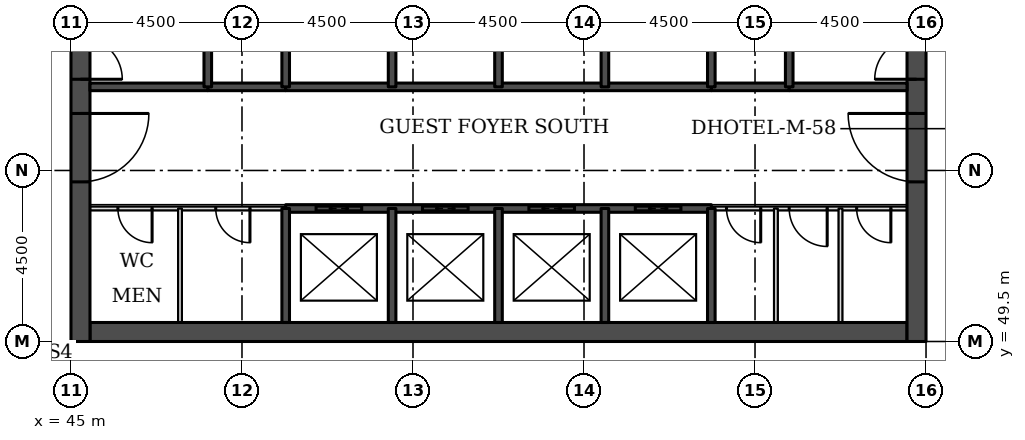
"""IFC4 building model, lengths in metres.
Left out: names, types, materials, properties, quantities, classifications, styles, units other than length and angle.
Written with IfcOpenShell. Run it as: python <this file> out.ifc"""

import sys

from ifc_helpers import new_model, si_unit, direction, frame, frame_2d, origin, place, context, subcontext, project, spatial, rectangle, extrude, element, fill, save


model = new_model("IFC4")
c1 = context("Model", 3, precision=1e-05, world=origin(), true_north=direction((0.0, 1.0)))
c2 = subcontext(c1, "Body", "Model", "MODEL_VIEW")
j1 = project(units=[si_unit("LENGTHUNIT", "METRE"), si_unit("PLANEANGLEUNIT", "RADIAN")], contexts=[c1])
p1 = place(None, origin())
s1 = spatial("IfcSite", under=j1, at=p1, CompositionType="ELEMENT")
p2 = place(p1, origin())
s2 = spatial("IfcBuilding", under=s1, at=p2, CompositionType="ELEMENT")
p3 = place(p2, frame((0.0, 0.0, 23.1)))
s3 = spatial("IfcBuildingStorey", under=s2, at=p3, CompositionType="ELEMENT", Elevation=23.1)
p4 = place(p3, frame((45.5, 49.75, 0.0), z_axis=(0.0, 0.0, 1.0), x_axis=(1.0, 0.0, 0.0)))
e1 = element("IfcWall", 1, at=p4, inside=s3, PredefinedType="SHEAR", context=c2, shape_type="SweptSolid", body=[
    extrude(rectangle(XDim=21.5, YDim=0.5, at=frame_2d((10.75, 0.0))), origin(), (0.0, 0.0, 1.0), 3.3),
])
p5 = place(p3, frame((45.25, 49.5, 0.0), z_axis=(0.0, 0.0, 1.0), x_axis=(0.0, 1.0, 0.0)))
e2 = element("IfcWall", 2, at=p5, inside=s3, PredefinedType="SHEAR", context=c2, shape_type="SweptSolid", body=[
    extrude(rectangle(XDim=22.5, YDim=0.5, at=frame_2d((11.25, 0.0))), origin(), (0.0, 0.0, 1.0), 3.3),
])
p6 = place(p5, frame((4.2, 0.0, 0.0)))
e3 = element("IfcOpeningElement", 3, at=p6, cuts=e2, PredefinedType="OPENING", context=c2, shape_type="SweptSolid", body=[
    extrude(rectangle(XDim=1.8, YDim=2.1, at=frame_2d((0.9, 1.05))), frame((0.0, 0.26, 0.0), z_axis=(0.0, -1.0, 0.0), x_axis=(1.0, 0.0, 0.0)), (0.0, 0.0, 1.0), 0.52),
])
p7 = place(p5, frame((6.9, 0.0, 0.0)))
e4 = element("IfcOpeningElement", 4, at=p7, cuts=e2, PredefinedType="OPENING", context=c2, shape_type="SweptSolid", body=[
    extrude(rectangle(XDim=1.1, YDim=2.1, at=frame_2d((0.55, 1.05))), frame((0.0, 0.26, 0.0), z_axis=(0.0, -1.0, 0.0), x_axis=(1.0, 0.0, 0.0)), (0.0, 0.0, 1.0), 0.52),
])
p8 = place(p5, frame((13.6, 0.0, 0.0)))
e5 = element("IfcOpeningElement", 5, at=p8, cuts=e2, PredefinedType="OPENING", context=c2, shape_type="SweptSolid", body=[
    extrude(rectangle(XDim=1.1, YDim=2.1, at=frame_2d((0.55, 1.05))), frame((0.0, 0.26, 0.0), z_axis=(0.0, -1.0, 0.0), x_axis=(1.0, 0.0, 0.0)), (0.0, 0.0, 1.0), 0.52),
])
p9 = place(p5, frame((16.5, 0.0, 0.0)))
e6 = element("IfcOpeningElement", 6, at=p9, cuts=e2, PredefinedType="OPENING", context=c2, shape_type="SweptSolid", body=[
    extrude(rectangle(XDim=1.8, YDim=2.1, at=frame_2d((0.9, 1.05))), frame((0.0, 0.26, 0.0), z_axis=(0.0, -1.0, 0.0), x_axis=(1.0, 0.0, 0.0)), (0.0, 0.0, 1.0), 0.52),
])
p10 = place(p3, frame((67.25, 49.5, 0.0), z_axis=(0.0, 0.0, 1.0), x_axis=(0.0, 1.0, 0.0)))
e7 = element("IfcWall", 7, at=p10, inside=s3, PredefinedType="SHEAR", context=c2, shape_type="SweptSolid", body=[
    extrude(rectangle(XDim=22.5, YDim=0.5, at=frame_2d((11.25, 0.0))), origin(), (0.0, 0.0, 1.0), 3.3),
])
p11 = place(p10, frame((4.2, 0.0, 0.0)))
e8 = element("IfcOpeningElement", 8, at=p11, cuts=e7, PredefinedType="OPENING", context=c2, shape_type="SweptSolid", body=[
    extrude(rectangle(XDim=1.8, YDim=2.1, at=frame_2d((0.9, 1.05))), frame((0.0, 0.26, 0.0), z_axis=(0.0, -1.0, 0.0), x_axis=(1.0, 0.0, 0.0)), (0.0, 0.0, 1.0), 0.52),
])
p12 = place(p10, frame((6.9, 0.0, 0.0)))
e9 = element("IfcOpeningElement", 9, at=p12, cuts=e7, PredefinedType="OPENING", context=c2, shape_type="SweptSolid", body=[
    extrude(rectangle(XDim=1.1, YDim=2.1, at=frame_2d((0.55, 1.05))), frame((0.0, 0.26, 0.0), z_axis=(0.0, -1.0, 0.0), x_axis=(1.0, 0.0, 0.0)), (0.0, 0.0, 1.0), 0.52),
])
p13 = place(p10, frame((13.6, 0.0, 0.0)))
e10 = element("IfcOpeningElement", 10, at=p13, cuts=e7, PredefinedType="OPENING", context=c2, shape_type="SweptSolid", body=[
    extrude(rectangle(XDim=1.1, YDim=2.1, at=frame_2d((0.55, 1.05))), frame((0.0, 0.26, 0.0), z_axis=(0.0, -1.0, 0.0), x_axis=(1.0, 0.0, 0.0)), (0.0, 0.0, 1.0), 0.52),
])
p14 = place(p10, frame((16.5, 0.0, 0.0)))
e11 = element("IfcOpeningElement", 11, at=p14, cuts=e7, PredefinedType="OPENING", context=c2, shape_type="SweptSolid", body=[
    extrude(rectangle(XDim=1.8, YDim=2.1, at=frame_2d((0.9, 1.05))), frame((0.0, 0.26, 0.0), z_axis=(0.0, -1.0, 0.0), x_axis=(1.0, 0.0, 0.0)), (0.0, 0.0, 1.0), 0.52),
])
p15 = place(p3, frame((45.5, 53.0, 0.0), z_axis=(0.0, 0.0, 1.0), x_axis=(1.0, 0.0, 0.0)))
e12 = element("IfcWall", 12, at=p15, inside=s3, PredefinedType="PARTITIONING", context=c2, shape_type="SweptSolid", body=[
    extrude(rectangle(XDim=5.15, YDim=0.1, at=frame_2d((2.575, 0.0))), origin(), (0.0, 0.0, 1.0), 3.08),
])
p16 = place(p15, frame((0.735, 0.0, 0.0)))
e13 = element("IfcOpeningElement", 13, at=p16, cuts=e12, PredefinedType="OPENING", context=c2, shape_type="SweptSolid", body=[
    extrude(rectangle(XDim=0.9, YDim=2.1, at=frame_2d((0.45, 1.05))), frame((0.0, 0.06, 0.0), z_axis=(0.0, -1.0, 0.0), x_axis=(1.0, 0.0, 0.0)), (0.0, 0.0, 1.0), 0.12),
])
p17 = place(p15, frame((3.31, 0.0, 0.0)))
e14 = element("IfcOpeningElement", 14, at=p17, cuts=e12, PredefinedType="OPENING", context=c2, shape_type="SweptSolid", body=[
    extrude(rectangle(XDim=0.9, YDim=2.1, at=frame_2d((0.45, 1.05))), frame((0.0, 0.06, 0.0), z_axis=(0.0, -1.0, 0.0), x_axis=(1.0, 0.0, 0.0)), (0.0, 0.0, 1.0), 0.12),
])
p18 = place(p3, frame((61.85, 53.0, 0.0), z_axis=(0.0, 0.0, 1.0), x_axis=(1.0, 0.0, 0.0)))
e15 = element("IfcWall", 15, at=p18, inside=s3, PredefinedType="PARTITIONING", context=c2, shape_type="SweptSolid", body=[
    extrude(rectangle(XDim=5.15, YDim=0.1, at=frame_2d((2.575, 0.0))), origin(), (0.0, 0.0, 1.0), 3.08),
])
p19 = place(p18, frame((3.824, 0.0, 0.0)))
e16 = element("IfcOpeningElement", 16, at=p19, cuts=e15, PredefinedType="OPENING", context=c2, shape_type="SweptSolid", body=[
    extrude(rectangle(XDim=0.9, YDim=2.1, at=frame_2d((0.45, 1.05))), frame((0.0, 0.06, 0.0), z_axis=(0.0, -1.0, 0.0), x_axis=(1.0, 0.0, 0.0)), (0.0, 0.0, 1.0), 0.12),
])
p20 = place(p18, frame((2.049, 0.0, 0.0)))
e17 = element("IfcOpeningElement", 17, at=p20, cuts=e15, PredefinedType="OPENING", context=c2, shape_type="SweptSolid", body=[
    extrude(rectangle(XDim=1.0, YDim=2.1, at=frame_2d((0.5, 1.05))), frame((0.0, 0.06, 0.0), z_axis=(0.0, -1.0, 0.0), x_axis=(1.0, 0.0, 0.0)), (0.0, 0.0, 1.0), 0.12),
])
p21 = place(p18, frame((0.4, 0.0, 0.0)))
e18 = element("IfcOpeningElement", 18, at=p21, cuts=e15, PredefinedType="OPENING", context=c2, shape_type="SweptSolid", body=[
    extrude(rectangle(XDim=0.9, YDim=2.1, at=frame_2d((0.45, 1.05))), frame((0.0, 0.06, 0.0), z_axis=(0.0, -1.0, 0.0), x_axis=(1.0, 0.0, 0.0)), (0.0, 0.0, 1.0), 0.12),
])
p22 = place(p3, frame((50.65, 53.0, 0.0), z_axis=(0.0, 0.0, 1.0), x_axis=(1.0, 0.0, 0.0)))
e19 = element("IfcWall", 19, at=p22, inside=s3, PredefinedType="SOLIDWALL", context=c2, shape_type="SweptSolid", body=[
    extrude(rectangle(XDim=11.2, YDim=0.2, at=frame_2d((5.6, 0.0))), origin(), (0.0, 0.0, 1.0), 3.08),
])
p23 = place(p22, frame((0.8, 0.0, 0.0)))
e20 = element("IfcOpeningElement", 20, at=p23, cuts=e19, PredefinedType="OPENING", context=c2, shape_type="SweptSolid", body=[
    extrude(rectangle(XDim=1.2, YDim=2.1, at=frame_2d((0.6, 1.05))), frame((0.0, 0.11, 0.0), z_axis=(0.0, -1.0, 0.0), x_axis=(1.0, 0.0, 0.0)), (0.0, 0.0, 1.0), 0.22),
])
p24 = place(p22, frame((3.6, 0.0, 0.0)))
e21 = element("IfcOpeningElement", 21, at=p24, cuts=e19, PredefinedType="OPENING", context=c2, shape_type="SweptSolid", body=[
    extrude(rectangle(XDim=1.2, YDim=2.1, at=frame_2d((0.6, 1.05))), frame((0.0, 0.11, 0.0), z_axis=(0.0, -1.0, 0.0), x_axis=(1.0, 0.0, 0.0)), (0.0, 0.0, 1.0), 0.22),
])
p25 = place(p22, frame((6.4, 0.0, 0.0)))
e22 = element("IfcOpeningElement", 22, at=p25, cuts=e19, PredefinedType="OPENING", context=c2, shape_type="SweptSolid", body=[
    extrude(rectangle(XDim=1.2, YDim=2.1, at=frame_2d((0.6, 1.05))), frame((0.0, 0.11, 0.0), z_axis=(0.0, -1.0, 0.0), x_axis=(1.0, 0.0, 0.0)), (0.0, 0.0, 1.0), 0.22),
])
p26 = place(p22, frame((9.2, 0.0, 0.0)))
e23 = element("IfcOpeningElement", 23, at=p26, cuts=e19, PredefinedType="OPENING", context=c2, shape_type="SweptSolid", body=[
    extrude(rectangle(XDim=1.2, YDim=2.1, at=frame_2d((0.6, 1.05))), frame((0.0, 0.11, 0.0), z_axis=(0.0, -1.0, 0.0), x_axis=(1.0, 0.0, 0.0)), (0.0, 0.0, 1.0), 0.22),
])
for number, where, z_axis, x_axis in (
    (24, (48.6, 56.2, 0.0), (0.0, 0.0, 1.0), (1.0, 0.0, 0.0)),
    (25, (61.85, 56.2, 0.0), (0.0, 0.0, 1.0), (1.0, 0.0, 0.0)),
):
    element("IfcWall", number, at=place(p3, frame(where, z_axis=z_axis, x_axis=x_axis)), inside=s3, PredefinedType="SOLIDWALL", context=c2, shape_type="SweptSolid", body=[
        extrude(rectangle(XDim=2.05, YDim=0.2, at=frame_2d((1.025, 0.0))), origin(), (0.0, 0.0, 1.0), 3.08),
    ])
p27 = place(p3, frame((45.5, 56.2, 0.0), z_axis=(0.0, 0.0, 1.0), x_axis=(1.0, 0.0, 0.0)))
e26 = element("IfcWall", 26, at=p27, inside=s3, PredefinedType="SOLIDWALL", context=c2, shape_type="SweptSolid", body=[
    extrude(rectangle(XDim=3.1, YDim=0.2, at=frame_2d((1.55, 0.0))), origin(), (0.0, 0.0, 1.0), 3.08),
])
p28 = place(p3, frame((50.65, 56.2, 0.0), z_axis=(0.0, 0.0, 1.0), x_axis=(1.0, 0.0, 0.0)))
e27 = element("IfcWall", 27, at=p28, inside=s3, PredefinedType="SOLIDWALL", context=c2, shape_type="SweptSolid", body=[
    extrude(rectangle(XDim=11.2, YDim=0.2, at=frame_2d((5.6, 0.0))), origin(), (0.0, 0.0, 1.0), 3.08),
])
p29 = place(p3, frame((63.9, 56.2, 0.0), z_axis=(0.0, 0.0, 1.0), x_axis=(1.0, 0.0, 0.0)))
e28 = element("IfcWall", 28, at=p29, inside=s3, PredefinedType="SOLIDWALL", context=c2, shape_type="SweptSolid", body=[
    extrude(rectangle(XDim=3.1, YDim=0.2, at=frame_2d((1.55, 0.0))), origin(), (0.0, 0.0, 1.0), 3.08),
])
p30 = place(p3, frame((47.869, 50.0, 0.0), z_axis=(0.0, 0.0, 1.0), x_axis=(0.0, 1.0, 0.0)))
e29 = element("IfcWall", 29, at=p30, inside=s3, PredefinedType="PARTITIONING", context=c2, shape_type="SweptSolid", body=[
    extrude(rectangle(XDim=3.0, YDim=0.1, at=frame_2d((1.5, 0.0))), origin(), (0.0, 0.0, 1.0), 3.08),
])
p31 = place(p3, frame((48.6, 56.2, 0.0), z_axis=(0.0, 0.0, 1.0), x_axis=(0.0, 1.0, 0.0)))
e30 = element("IfcWall", 30, at=p31, inside=s3, PredefinedType="SOLIDWALL", context=c2, shape_type="SweptSolid", body=[
    extrude(rectangle(XDim=5.8, YDim=0.2, at=frame_2d((2.9, 0.0))), origin(), (0.0, 0.0, 1.0), 3.08),
])
p32 = place(p3, frame((50.65, 50.0, 0.0), z_axis=(0.0, 0.0, 1.0), x_axis=(0.0, 1.0, 0.0)))
e31 = element("IfcWall", 31, at=p32, inside=s3, PredefinedType="SOLIDWALL", context=c2, shape_type="SweptSolid", body=[
    extrude(rectangle(XDim=3.0, YDim=0.2, at=frame_2d((1.5, 0.0))), origin(), (0.0, 0.0, 1.0), 3.08),
])
p33 = place(p3, frame((50.65, 56.2, 0.0), z_axis=(0.0, 0.0, 1.0), x_axis=(0.0, 1.0, 0.0)))
e32 = element("IfcWall", 32, at=p33, inside=s3, PredefinedType="SOLIDWALL", context=c2, shape_type="SweptSolid", body=[
    extrude(rectangle(XDim=2.8, YDim=0.2, at=frame_2d((1.4, 0.0))), origin(), (0.0, 0.0, 1.0), 3.08),
])
p34 = place(p3, frame((53.45, 50.0, 0.0), z_axis=(0.0, 0.0, 1.0), x_axis=(0.0, 1.0, 0.0)))
e33 = element("IfcWall", 33, at=p34, inside=s3, PredefinedType="SOLIDWALL", context=c2, shape_type="SweptSolid", body=[
    extrude(rectangle(XDim=3.0, YDim=0.2, at=frame_2d((1.5, 0.0))), origin(), (0.0, 0.0, 1.0), 3.08),
])
p35 = place(p3, frame((53.45, 56.2, 0.0), z_axis=(0.0, 0.0, 1.0), x_axis=(0.0, 1.0, 0.0)))
e34 = element("IfcWall", 34, at=p35, inside=s3, PredefinedType="SOLIDWALL", context=c2, shape_type="SweptSolid", body=[
    extrude(rectangle(XDim=2.8, YDim=0.2, at=frame_2d((1.4, 0.0))), origin(), (0.0, 0.0, 1.0), 3.08),
])
p36 = place(p3, frame((56.25, 50.0, 0.0), z_axis=(0.0, 0.0, 1.0), x_axis=(0.0, 1.0, 0.0)))
e35 = element("IfcWall", 35, at=p36, inside=s3, PredefinedType="SOLIDWALL", context=c2, shape_type="SweptSolid", body=[
    extrude(rectangle(XDim=3.0, YDim=0.2, at=frame_2d((1.5, 0.0))), origin(), (0.0, 0.0, 1.0), 3.08),
])
p37 = place(p3, frame((56.25, 56.2, 0.0), z_axis=(0.0, 0.0, 1.0), x_axis=(0.0, 1.0, 0.0)))
e36 = element("IfcWall", 36, at=p37, inside=s3, PredefinedType="SOLIDWALL", context=c2, shape_type="SweptSolid", body=[
    extrude(rectangle(XDim=2.8, YDim=0.2, at=frame_2d((1.4, 0.0))), origin(), (0.0, 0.0, 1.0), 3.08),
])
p38 = place(p3, frame((59.05, 50.0, 0.0), z_axis=(0.0, 0.0, 1.0), x_axis=(0.0, 1.0, 0.0)))
e37 = element("IfcWall", 37, at=p38, inside=s3, PredefinedType="SOLIDWALL", context=c2, shape_type="SweptSolid", body=[
    extrude(rectangle(XDim=3.0, YDim=0.2, at=frame_2d((1.5, 0.0))), origin(), (0.0, 0.0, 1.0), 3.08),
])
p39 = place(p3, frame((59.05, 56.2, 0.0), z_axis=(0.0, 0.0, 1.0), x_axis=(0.0, 1.0, 0.0)))
e38 = element("IfcWall", 38, at=p39, inside=s3, PredefinedType="SOLIDWALL", context=c2, shape_type="SweptSolid", body=[
    extrude(rectangle(XDim=2.8, YDim=0.2, at=frame_2d((1.4, 0.0))), origin(), (0.0, 0.0, 1.0), 3.08),
])
p40 = place(p3, frame((61.85, 50.0, 0.0), z_axis=(0.0, 0.0, 1.0), x_axis=(0.0, 1.0, 0.0)))
e39 = element("IfcWall", 39, at=p40, inside=s3, PredefinedType="SOLIDWALL", context=c2, shape_type="SweptSolid", body=[
    extrude(rectangle(XDim=3.0, YDim=0.2, at=frame_2d((1.5, 0.0))), origin(), (0.0, 0.0, 1.0), 3.08),
])
p41 = place(p3, frame((61.85, 56.2, 0.0), z_axis=(0.0, 0.0, 1.0), x_axis=(0.0, 1.0, 0.0)))
e40 = element("IfcWall", 40, at=p41, inside=s3, PredefinedType="SOLIDWALL", context=c2, shape_type="SweptSolid", body=[
    extrude(rectangle(XDim=2.8, YDim=0.2, at=frame_2d((1.4, 0.0))), origin(), (0.0, 0.0, 1.0), 3.08),
])
p42 = place(p3, frame((63.55, 50.0, 0.0), z_axis=(0.0, 0.0, 1.0), x_axis=(0.0, 1.0, 0.0)))
e41 = element("IfcWall", 41, at=p42, inside=s3, PredefinedType="PARTITIONING", context=c2, shape_type="SweptSolid", body=[
    extrude(rectangle(XDim=3.0, YDim=0.1, at=frame_2d((1.5, 0.0))), origin(), (0.0, 0.0, 1.0), 3.08),
])
p43 = place(p3, frame((63.9, 56.2, 0.0), z_axis=(0.0, 0.0, 1.0), x_axis=(0.0, 1.0, 0.0)))
e42 = element("IfcWall", 42, at=p43, inside=s3, PredefinedType="SOLIDWALL", context=c2, shape_type="SweptSolid", body=[
    extrude(rectangle(XDim=5.8, YDim=0.2, at=frame_2d((2.9, 0.0))), origin(), (0.0, 0.0, 1.0), 3.08),
])
p44 = place(p3, frame((65.249, 50.0, 0.0), z_axis=(0.0, 0.0, 1.0), x_axis=(0.0, 1.0, 0.0)))
e43 = element("IfcWall", 43, at=p44, inside=s3, PredefinedType="PARTITIONING", context=c2, shape_type="SweptSolid", body=[
    extrude(rectangle(XDim=3.0, YDim=0.1, at=frame_2d((1.5, 0.0))), origin(), (0.0, 0.0, 1.0), 3.08),
])
p45 = place(p23, origin())
e44 = element("IfcDoor", 44, at=p45, inside=s3, OperationType="DOUBLE_DOOR_SLIDING", PredefinedType="DOOR", context=c2, shape_type="SweptSolid", body=[
    extrude(rectangle(XDim=1.2, YDim=2.1, at=frame_2d((0.6, 1.05))), frame((0.0, 0.025, 0.0), z_axis=(0.0, -1.0, 0.0), x_axis=(1.0, 0.0, 0.0)), (0.0, 0.0, 1.0), 0.05),
])
fill(e20, e44)
p46 = place(p24, origin())
e45 = element("IfcDoor", 45, at=p46, inside=s3, OperationType="DOUBLE_DOOR_SLIDING", PredefinedType="DOOR", context=c2, shape_type="SweptSolid", body=[
    extrude(rectangle(XDim=1.2, YDim=2.1, at=frame_2d((0.6, 1.05))), frame((0.0, 0.025, 0.0), z_axis=(0.0, -1.0, 0.0), x_axis=(1.0, 0.0, 0.0)), (0.0, 0.0, 1.0), 0.05),
])
fill(e21, e45)
p47 = place(p25, origin())
e46 = element("IfcDoor", 46, at=p47, inside=s3, OperationType="DOUBLE_DOOR_SLIDING", PredefinedType="DOOR", context=c2, shape_type="SweptSolid", body=[
    extrude(rectangle(XDim=1.2, YDim=2.1, at=frame_2d((0.6, 1.05))), frame((0.0, 0.025, 0.0), z_axis=(0.0, -1.0, 0.0), x_axis=(1.0, 0.0, 0.0)), (0.0, 0.0, 1.0), 0.05),
])
fill(e22, e46)
p48 = place(p26, origin())
e47 = element("IfcDoor", 47, at=p48, inside=s3, OperationType="DOUBLE_DOOR_SLIDING", PredefinedType="DOOR", context=c2, shape_type="SweptSolid", body=[
    extrude(rectangle(XDim=1.2, YDim=2.1, at=frame_2d((0.6, 1.05))), frame((0.0, 0.025, 0.0), z_axis=(0.0, -1.0, 0.0), x_axis=(1.0, 0.0, 0.0)), (0.0, 0.0, 1.0), 0.05),
])
fill(e23, e47)
p49 = place(p6, frame((1.8, 0.0, 0.0), z_axis=(0.0, 0.0, 1.0), x_axis=(-1.0, 0.0, 0.0)))
e48 = element("IfcDoor", 48, at=p49, inside=s3, OperationType="SINGLE_SWING_LEFT", PredefinedType="DOOR", context=c2, shape_type="SweptSolid", body=[
    extrude(rectangle(XDim=1.8, YDim=2.1, at=frame_2d((0.9, 1.05))), frame((0.0, 0.025, 0.0), z_axis=(0.0, -1.0, 0.0), x_axis=(1.0, 0.0, 0.0)), (0.0, 0.0, 1.0), 0.05),
])
fill(e3, e48)
p50 = place(p7, frame((1.1, 0.0, 0.0), z_axis=(0.0, 0.0, 1.0), x_axis=(-1.0, 0.0, 0.0)))
e49 = element("IfcDoor", 49, at=p50, inside=s3, OperationType="SINGLE_SWING_RIGHT", PredefinedType="DOOR", context=c2, shape_type="SweptSolid", body=[
    extrude(rectangle(XDim=1.1, YDim=2.1, at=frame_2d((0.55, 1.05))), frame((0.0, 0.025, 0.0), z_axis=(0.0, -1.0, 0.0), x_axis=(1.0, 0.0, 0.0)), (0.0, 0.0, 1.0), 0.05),
])
fill(e4, e49)
p51 = place(p11, origin())
e50 = element("IfcDoor", 50, at=p51, inside=s3, OperationType="SINGLE_SWING_RIGHT", PredefinedType="DOOR", context=c2, shape_type="SweptSolid", body=[
    extrude(rectangle(XDim=1.8, YDim=2.1, at=frame_2d((0.9, 1.05))), frame((0.0, 0.025, 0.0), z_axis=(0.0, -1.0, 0.0), x_axis=(1.0, 0.0, 0.0)), (0.0, 0.0, 1.0), 0.05),
])
fill(e8, e50)
p52 = place(p12, origin())
e51 = element("IfcDoor", 51, at=p52, inside=s3, OperationType="SINGLE_SWING_LEFT", PredefinedType="DOOR", context=c2, shape_type="SweptSolid", body=[
    extrude(rectangle(XDim=1.1, YDim=2.1, at=frame_2d((0.55, 1.05))), frame((0.0, 0.025, 0.0), z_axis=(0.0, -1.0, 0.0), x_axis=(1.0, 0.0, 0.0)), (0.0, 0.0, 1.0), 0.05),
])
fill(e9, e51)
p53 = place(p19, frame((0.9, 0.0, 0.0), z_axis=(0.0, 0.0, 1.0), x_axis=(-1.0, 0.0, 0.0)))
e52 = element("IfcDoor", 52, at=p53, inside=s3, OperationType="SINGLE_SWING_LEFT", PredefinedType="DOOR", context=c2, shape_type="SweptSolid", body=[
    extrude(rectangle(XDim=0.9, YDim=2.1, at=frame_2d((0.45, 1.05))), frame((0.0, 0.025, 0.0), z_axis=(0.0, -1.0, 0.0), x_axis=(1.0, 0.0, 0.0)), (0.0, 0.0, 1.0), 0.05),
])
fill(e16, e52)
p54 = place(p20, frame((1.0, 0.0, 0.0), z_axis=(0.0, 0.0, 1.0), x_axis=(-1.0, 0.0, 0.0)))
e53 = element("IfcDoor", 53, at=p54, inside=s3, OperationType="SINGLE_SWING_LEFT", PredefinedType="DOOR", context=c2, shape_type="SweptSolid", body=[
    extrude(rectangle(XDim=1.0, YDim=2.1, at=frame_2d((0.5, 1.05))), frame((0.0, 0.025, 0.0), z_axis=(0.0, -1.0, 0.0), x_axis=(1.0, 0.0, 0.0)), (0.0, 0.0, 1.0), 0.05),
])
fill(e17, e53)
p55 = place(p21, frame((0.9, 0.0, 0.0), z_axis=(0.0, 0.0, 1.0), x_axis=(-1.0, 0.0, 0.0)))
e54 = element("IfcDoor", 54, at=p55, inside=s3, OperationType="SINGLE_SWING_LEFT", PredefinedType="DOOR", context=c2, shape_type="SweptSolid", body=[
    extrude(rectangle(XDim=0.9, YDim=2.1, at=frame_2d((0.45, 1.05))), frame((0.0, 0.025, 0.0), z_axis=(0.0, -1.0, 0.0), x_axis=(1.0, 0.0, 0.0)), (0.0, 0.0, 1.0), 0.05),
])
fill(e18, e54)
p56 = place(p16, frame((0.9, 0.0, 0.0), z_axis=(0.0, 0.0, 1.0), x_axis=(-1.0, 0.0, 0.0)))
e55 = element("IfcDoor", 55, at=p56, inside=s3, OperationType="SINGLE_SWING_LEFT", PredefinedType="DOOR", context=c2, shape_type="SweptSolid", body=[
    extrude(rectangle(XDim=0.9, YDim=2.1, at=frame_2d((0.45, 1.05))), frame((0.0, 0.025, 0.0), z_axis=(0.0, -1.0, 0.0), x_axis=(1.0, 0.0, 0.0)), (0.0, 0.0, 1.0), 0.05),
])
fill(e13, e55)
p57 = place(p17, frame((0.9, 0.0, 0.0), z_axis=(0.0, 0.0, 1.0), x_axis=(-1.0, 0.0, 0.0)))
e56 = element("IfcDoor", 56, at=p57, inside=s3, OperationType="SINGLE_SWING_LEFT", PredefinedType="DOOR", context=c2, shape_type="SweptSolid", body=[
    extrude(rectangle(XDim=0.9, YDim=2.1, at=frame_2d((0.45, 1.05))), frame((0.0, 0.025, 0.0), z_axis=(0.0, -1.0, 0.0), x_axis=(1.0, 0.0, 0.0)), (0.0, 0.0, 1.0), 0.05),
])
fill(e14, e56)
save(model, sys.argv[1])
